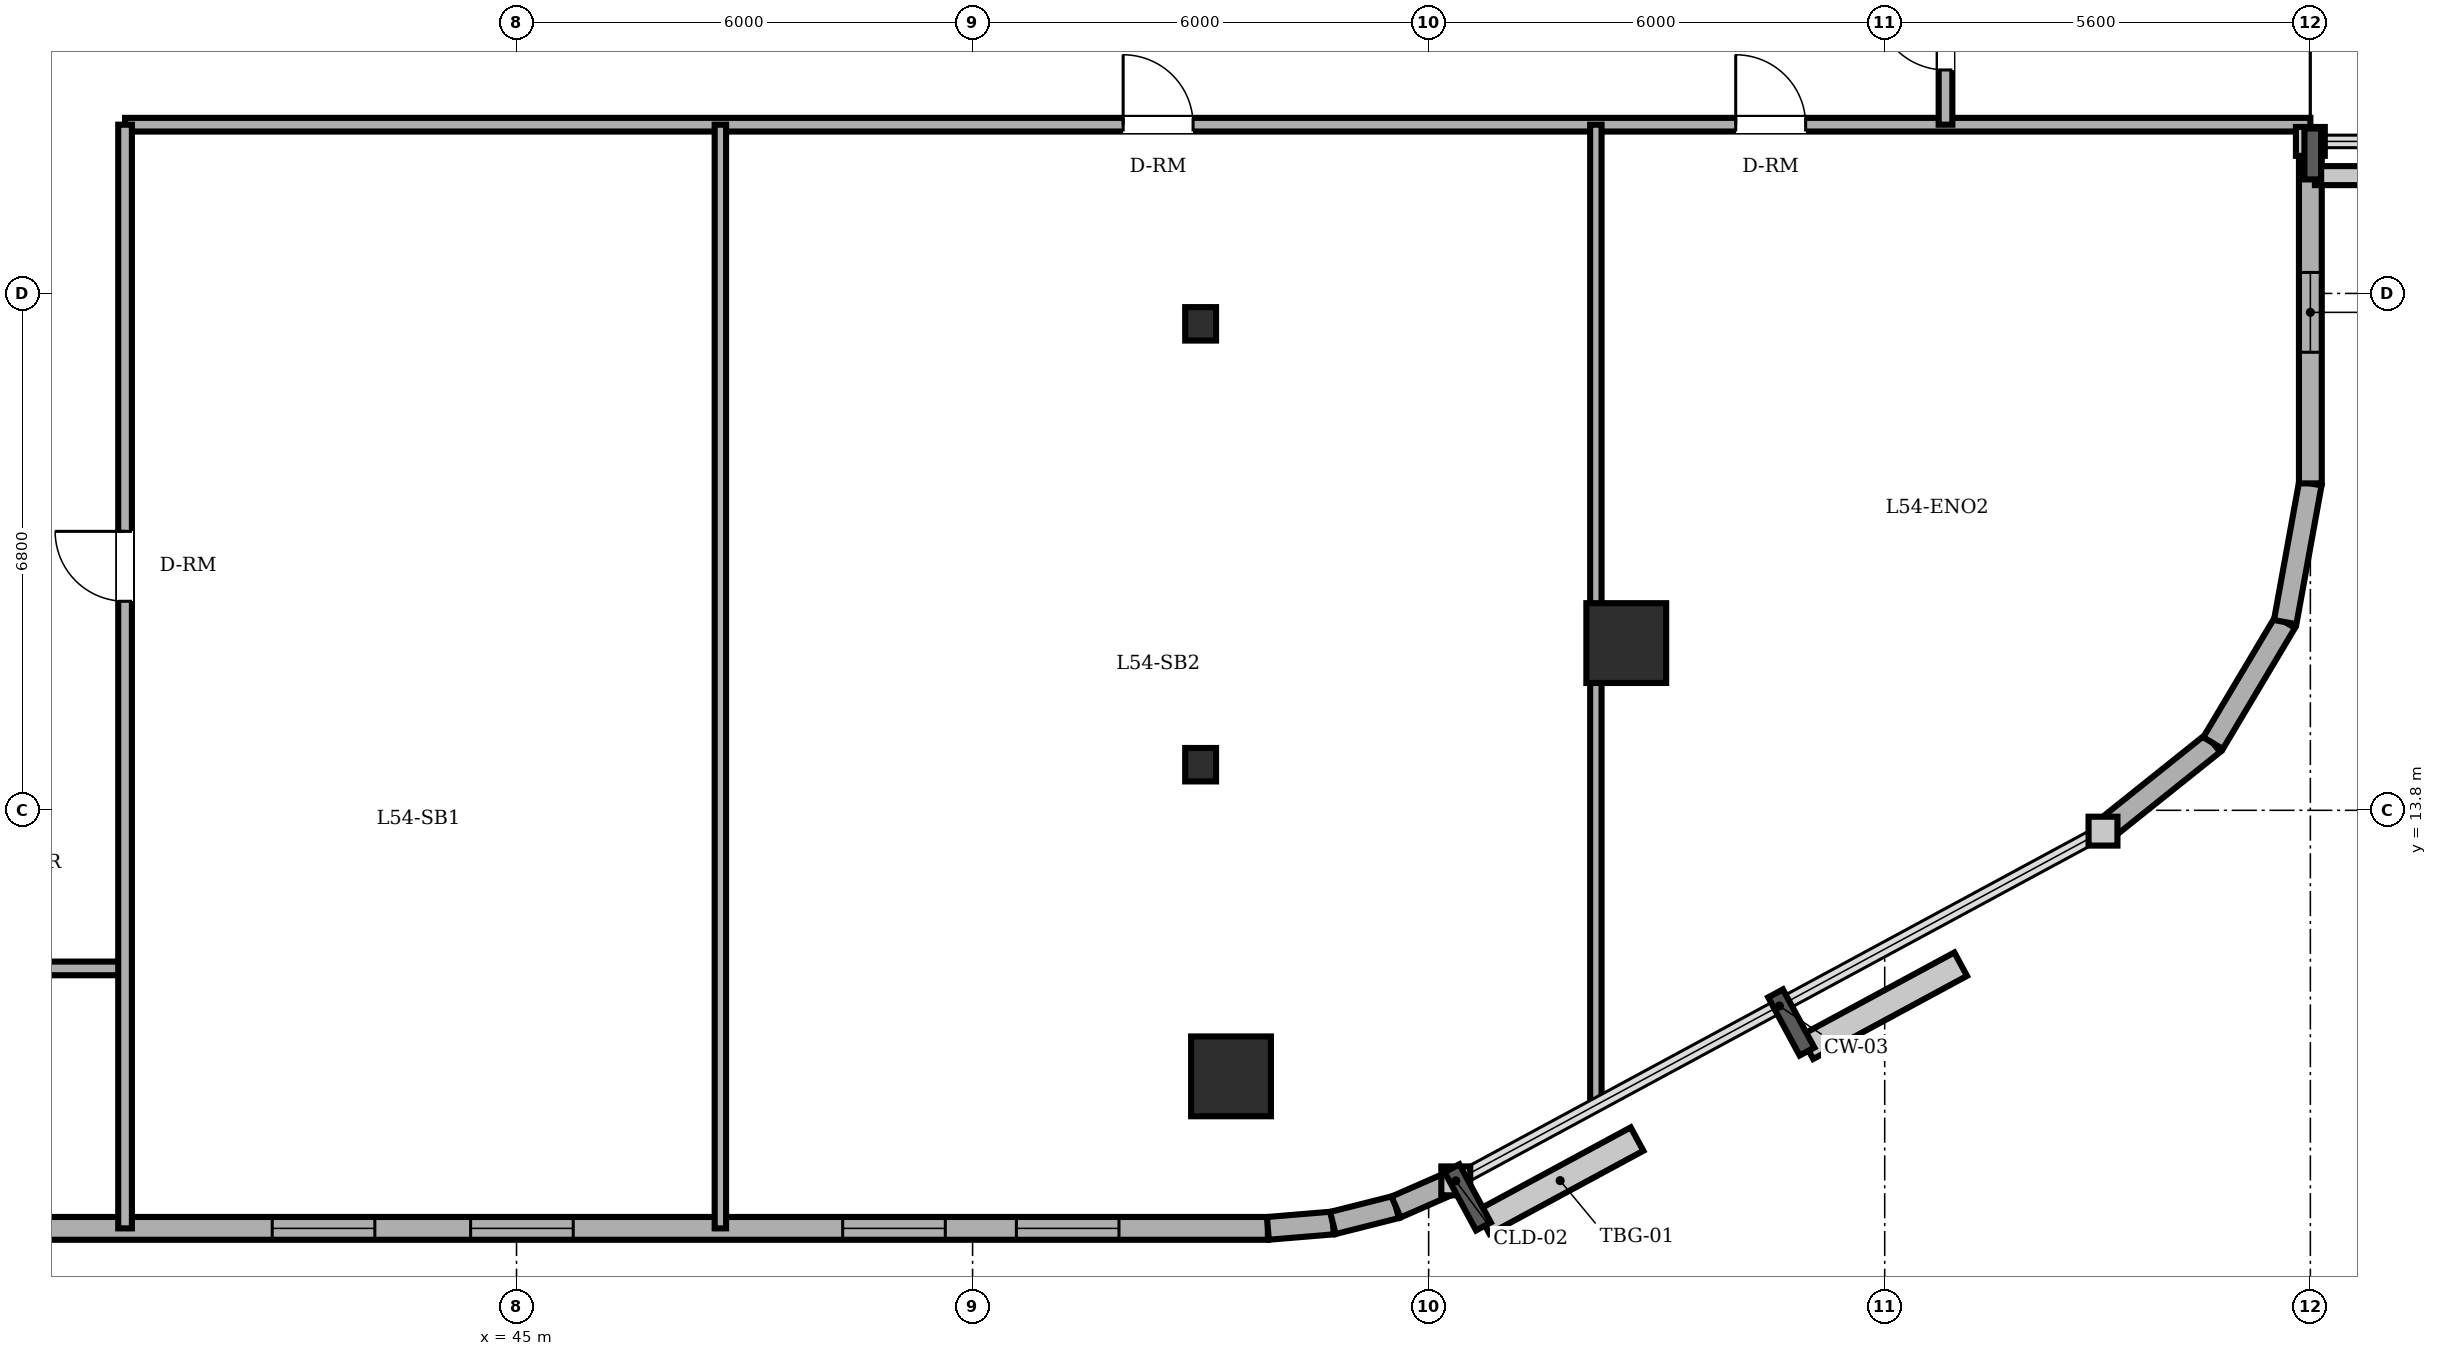
"""IFC4 building model, lengths in metres.
Left out: names, types, materials, properties, quantities, classifications, styles, units other than length and angle.
Written with IfcOpenShell. Run it as: python <this file> out.ifc"""

import sys

from ifc_helpers import new_model, si_unit, direction, frame, frame_2d, origin, origin_2d, place, context, subcontext, project, spatial, rectangle, circle, i_section, extrude, element, fill, save


model = new_model("IFC4")
c1 = context("Model", 3, precision=1e-05, world=origin(), true_north=direction((0.0, 1.0)))
c2 = subcontext(c1, "Body", "Model", "MODEL_VIEW")
j1 = project(units=[si_unit("LENGTHUNIT", "METRE"), si_unit("PLANEANGLEUNIT", "RADIAN")], contexts=[c1])
p1 = place(None, origin())
s1 = spatial("IfcSite", under=j1, at=p1, CompositionType="ELEMENT")
p2 = place(p1, origin())
s2 = spatial("IfcBuilding", under=s1, at=p2, CompositionType="ELEMENT")
p3 = place(p2, frame((0.0, 0.0, 208.5)))
s3 = spatial("IfcBuildingStorey", under=s2, at=p3, CompositionType="ELEMENT", Elevation=208.5)
for number, where, z_axis, x_axis in (
    (1, (54.4, 10.3, 0.0), (0.0, 0.0, 1.0), (1.0, 0.0, 0.0)),
    (2, (59.6, 16.0, 0.0), (0.0, 0.0, 1.0), (1.0, 0.0, 0.0)),
):
    element("IfcColumn", number, at=place(p3, frame(where, z_axis=z_axis, x_axis=x_axis)), inside=s3, PredefinedType="COLUMN", context=c2, shape_type="SweptSolid", body=[
        extrude(circle(Radius=0.525, at=origin_2d()), origin(), (0.0, 0.0, 1.0), 3.6),
    ])
for number, where, z_axis, x_axis in (
    (3, (54.0, 14.4, 0.0), (0.0, 0.0, 1.0), (1.0, 0.0, 0.0)),
    (4, (54.0, 20.2, 0.0), (0.0, 0.0, 1.0), (1.0, 0.0, 0.0)),
):
    element("IfcColumn", number, at=place(p3, frame(where, z_axis=z_axis, x_axis=x_axis)), inside=s3, PredefinedType="COLUMN", context=c2, shape_type="SweptSolid", body=[
        extrude(i_section(OverallWidth=0.406, OverallDepth=0.44, WebThickness=0.024, FlangeThickness=0.039, FilletRadius=0.015, at=origin_2d()), origin(), (0.0, 0.0, 1.0), 3.6),
    ])
p4 = place(p3, frame((22.4, 8.3, 0.0), z_axis=(0.0, 0.0, 1.0), x_axis=(1.0, 0.0, 0.0)))
e5 = element("IfcWall", 5, at=p4, inside=s3, PredefinedType="SOLIDWALL", context=c2, shape_type="SweptSolid", body=[
    extrude(rectangle(XDim=32.485, YDim=0.3, at=frame_2d((16.243, 0.0))), origin(), (0.0, 0.0, 1.0), 3.4),
])
p5 = place(p4, frame((5.075, 0.0, 0.0)))
e6 = element("IfcOpeningElement", 6, at=p5, cuts=e5, PredefinedType="OPENING", context=c2, shape_type="SweptSolid", body=[
    extrude(rectangle(XDim=0.95, YDim=2.2, at=frame_2d((0.475, 1.1))), frame((0.0, 0.16, 0.0), z_axis=(0.0, -1.0, 0.0), x_axis=(1.0, 0.0, 0.0)), (0.0, 0.0, 1.0), 0.32),
])
p6 = place(p4, frame((1.3, 0.0, 0.85)))
e7 = element("IfcOpeningElement", 7, at=p6, cuts=e5, PredefinedType="OPENING", context=c2, shape_type="SweptSolid", body=[
    extrude(rectangle(XDim=1.35, YDim=1.55, at=frame_2d((0.675, 0.775))), frame((0.0, 0.16, 0.0), z_axis=(0.0, -1.0, 0.0), x_axis=(1.0, 0.0, 0.0)), (0.0, 0.0, 1.0), 0.32),
])
p7 = place(p4, frame((10.075, 0.0, 0.85)))
e8 = element("IfcOpeningElement", 8, at=p7, cuts=e5, PredefinedType="OPENING", context=c2, shape_type="SweptSolid", body=[
    extrude(rectangle(XDim=1.35, YDim=1.55, at=frame_2d((0.675, 0.775))), frame((0.0, 0.16, 0.0), z_axis=(0.0, -1.0, 0.0), x_axis=(1.0, 0.0, 0.0)), (0.0, 0.0, 1.0), 0.32),
])
p8 = place(p4, frame((13.425, 0.0, 0.85)))
e9 = element("IfcOpeningElement", 9, at=p8, cuts=e5, PredefinedType="OPENING", context=c2, shape_type="SweptSolid", body=[
    extrude(rectangle(XDim=1.35, YDim=1.55, at=frame_2d((0.675, 0.775))), frame((0.0, 0.16, 0.0), z_axis=(0.0, -1.0, 0.0), x_axis=(1.0, 0.0, 0.0)), (0.0, 0.0, 1.0), 0.32),
])
p9 = place(p4, frame((19.386, 0.0, 0.85)))
e10 = element("IfcOpeningElement", 10, at=p9, cuts=e5, PredefinedType="OPENING", context=c2, shape_type="SweptSolid", body=[
    extrude(rectangle(XDim=1.35, YDim=1.55, at=frame_2d((0.675, 0.775))), frame((0.0, 0.16, 0.0), z_axis=(0.0, -1.0, 0.0), x_axis=(1.0, 0.0, 0.0)), (0.0, 0.0, 1.0), 0.32),
])
p10 = place(p4, frame((21.996, 0.0, 0.85)))
e11 = element("IfcOpeningElement", 11, at=p10, cuts=e5, PredefinedType="OPENING", context=c2, shape_type="SweptSolid", body=[
    extrude(rectangle(XDim=1.35, YDim=1.55, at=frame_2d((0.675, 0.775))), frame((0.0, 0.16, 0.0), z_axis=(0.0, -1.0, 0.0), x_axis=(1.0, 0.0, 0.0)), (0.0, 0.0, 1.0), 0.32),
])
p11 = place(p4, frame((26.891, 0.0, 0.85)))
e12 = element("IfcOpeningElement", 12, at=p11, cuts=e5, PredefinedType="OPENING", context=c2, shape_type="SweptSolid", body=[
    extrude(rectangle(XDim=1.35, YDim=1.55, at=frame_2d((0.675, 0.775))), frame((0.0, 0.16, 0.0), z_axis=(0.0, -1.0, 0.0), x_axis=(1.0, 0.0, 0.0)), (0.0, 0.0, 1.0), 0.32),
])
p12 = place(p4, frame((29.176, 0.0, 0.85)))
e13 = element("IfcOpeningElement", 13, at=p12, cuts=e5, PredefinedType="OPENING", context=c2, shape_type="SweptSolid", body=[
    extrude(rectangle(XDim=1.35, YDim=1.55, at=frame_2d((0.675, 0.775))), frame((0.0, 0.16, 0.0), z_axis=(0.0, -1.0, 0.0), x_axis=(1.0, 0.0, 0.0)), (0.0, 0.0, 1.0), 0.32),
])
p13 = place(p3, frame((54.885, 8.3, 0.0), z_axis=(0.0, 0.0, 1.0), x_axis=(0.996565355958, 0.082809971041, 0.0)))
e14 = element("IfcWall", 14, at=p13, inside=s3, PredefinedType="SOLIDWALL", context=c2, shape_type="SweptSolid", body=[
    extrude(rectangle(XDim=0.858, YDim=0.3, at=frame_2d((0.429, 0.0))), origin(), (0.0, 0.0, 1.0), 3.4),
])
p14 = place(p3, frame((55.74, 8.371, 0.0), z_axis=(0.0, 0.0, 1.0), x_axis=(0.969536346338, 0.244947490555, 0.0)))
e15 = element("IfcWall", 15, at=p14, inside=s3, PredefinedType="SOLIDWALL", context=c2, shape_type="SweptSolid", body=[
    extrude(rectangle(XDim=0.857, YDim=0.3, at=frame_2d((0.429, 0.0))), origin(), (0.0, 0.0, 1.0), 3.4),
])
p15 = place(p3, frame((56.571, 8.581, 0.0), z_axis=(0.0, 0.0, 1.0), x_axis=(0.916085473636, 0.400983048261, 0.0)))
e16 = element("IfcWall", 16, at=p15, inside=s3, PredefinedType="SOLIDWALL", context=c2, shape_type="SweptSolid", body=[
    extrude(rectangle(XDim=0.858, YDim=0.3, at=frame_2d((0.429, 0.0))), origin(), (0.0, 0.0, 1.0), 3.4),
])
p16 = place(p3, frame((65.872, 13.526, 0.0), z_axis=(0.0, 0.0, 1.0), x_axis=(0.780920189257, 0.624630817372, 0.0)))
e17 = element("IfcWall", 17, at=p16, inside=s3, PredefinedType="SOLIDWALL", context=c2, shape_type="SweptSolid", body=[
    extrude(rectangle(XDim=1.854, YDim=0.3, at=frame_2d((0.927, 0.0))), origin(), (0.0, 0.0, 1.0), 3.4),
])
p17 = place(p3, frame((67.32, 14.684, 0.0), z_axis=(0.0, 0.0, 1.0), x_axis=(0.512072018927, 0.858942516955, 0.0)))
e18 = element("IfcWall", 18, at=p17, inside=s3, PredefinedType="SOLIDWALL", context=c2, shape_type="SweptSolid", body=[
    extrude(rectangle(XDim=1.853, YDim=0.3, at=frame_2d((0.927, 0.0))), origin(), (0.0, 0.0, 1.0), 3.4),
])
p18 = place(p3, frame((68.269, 16.276, 0.0), z_axis=(0.0, 0.0, 1.0), x_axis=(0.178468469252, 0.983945631365, 0.0)))
e19 = element("IfcWall", 19, at=p18, inside=s3, PredefinedType="SOLIDWALL", context=c2, shape_type="SweptSolid", body=[
    extrude(rectangle(XDim=1.855, YDim=0.3, at=frame_2d((0.927, 0.0))), origin(), (0.0, 0.0, 1.0), 3.4),
])
p19 = place(p3, frame((68.6, 18.101, 0.0), z_axis=(0.0, 0.0, 1.0), x_axis=(0.0, 1.0, 0.0)))
e20 = element("IfcWall", 20, at=p19, inside=s3, PredefinedType="SOLIDWALL", context=c2, shape_type="SweptSolid", body=[
    extrude(rectangle(XDim=4.499, YDim=0.3, at=frame_2d((2.25, 0.0))), origin(), (0.0, 0.0, 1.0), 3.4),
])
p20 = place(p19, frame((1.725, 0.0, 0.85)))
e21 = element("IfcOpeningElement", 21, at=p20, cuts=e20, PredefinedType="OPENING", context=c2, shape_type="SweptSolid", body=[
    extrude(rectangle(XDim=1.05, YDim=1.55, at=frame_2d((0.525, 0.775))), frame((0.0, 0.16, 0.0), z_axis=(0.0, -1.0, 0.0), x_axis=(1.0, 0.0, 0.0)), (0.0, 0.0, 1.0), 0.32),
])
p21 = place(p3, frame((17.677, 11.72, 0.0), z_axis=(0.0, 0.0, 1.0), x_axis=(1.0, 0.0, 0.0)))
e22 = element("IfcWall", 22, at=p21, inside=s3, PredefinedType="PARTITIONING", context=c2, shape_type="SweptSolid", body=[
    extrude(rectangle(XDim=22.173, YDim=0.18, at=frame_2d((11.086, 0.0))), origin(), (0.0, 0.0, 1.0), 3.4),
])
p22 = place(p21, frame((9.763, 0.0, 0.0)))
e23 = element("IfcOpeningElement", 23, at=p22, cuts=e22, PredefinedType="OPENING", context=c2, shape_type="SweptSolid", body=[
    extrude(rectangle(XDim=0.92, YDim=2.1, at=frame_2d((0.46, 1.05))), frame((0.0, 0.1, 0.0), z_axis=(0.0, -1.0, 0.0), x_axis=(1.0, 0.0, 0.0)), (0.0, 0.0, 1.0), 0.2),
])
p23 = place(p21, frame((4.063, 0.0, 0.0)))
e24 = element("IfcOpeningElement", 24, at=p23, cuts=e22, PredefinedType="OPENING", context=c2, shape_type="SweptSolid", body=[
    extrude(rectangle(XDim=0.92, YDim=2.1, at=frame_2d((0.46, 1.05))), frame((0.0, 0.1, 0.0), z_axis=(0.0, -1.0, 0.0), x_axis=(1.0, 0.0, 0.0)), (0.0, 0.0, 1.0), 0.2),
])
p24 = place(p21, frame((16.428, 0.0, 0.0)))
e25 = element("IfcOpeningElement", 25, at=p24, cuts=e22, PredefinedType="OPENING", context=c2, shape_type="SweptSolid", body=[
    extrude(rectangle(XDim=0.92, YDim=2.1, at=frame_2d((0.46, 1.05))), frame((0.0, 0.1, 0.0), z_axis=(0.0, -1.0, 0.0), x_axis=(1.0, 0.0, 0.0)), (0.0, 0.0, 1.0), 0.2),
])
p25 = place(p3, frame((39.85, 22.82, 0.0), z_axis=(0.0, 0.0, 1.0), x_axis=(1.0, 0.0, 0.0)))
e26 = element("IfcWall", 26, at=p25, inside=s3, PredefinedType="PARTITIONING", context=c2, shape_type="SweptSolid", body=[
    extrude(rectangle(XDim=28.75, YDim=0.18, at=frame_2d((14.375, 0.0))), origin(), (0.0, 0.0, 1.0), 3.4),
])
p26 = place(p25, frame((13.131, 0.0, 0.0)))
e27 = element("IfcOpeningElement", 27, at=p26, cuts=e26, PredefinedType="OPENING", context=c2, shape_type="SweptSolid", body=[
    extrude(rectangle(XDim=0.92, YDim=2.1, at=frame_2d((0.46, 1.05))), frame((0.0, 0.1, 0.0), z_axis=(0.0, -1.0, 0.0), x_axis=(1.0, 0.0, 0.0)), (0.0, 0.0, 1.0), 0.2),
])
p27 = place(p25, frame((21.19, 0.0, 0.0)))
e28 = element("IfcOpeningElement", 28, at=p27, cuts=e26, PredefinedType="OPENING", context=c2, shape_type="SweptSolid", body=[
    extrude(rectangle(XDim=0.92, YDim=2.1, at=frame_2d((0.46, 1.05))), frame((0.0, 0.1, 0.0), z_axis=(0.0, -1.0, 0.0), x_axis=(1.0, 0.0, 0.0)), (0.0, 0.0, 1.0), 0.2),
])
p28 = place(p3, frame((39.85, 8.3, 0.0), z_axis=(0.0, 0.0, 1.0), x_axis=(0.0, 1.0, 0.0)))
e29 = element("IfcWall", 29, at=p28, inside=s3, PredefinedType="PARTITIONING", context=c2, shape_type="SweptSolid", body=[
    extrude(rectangle(XDim=14.52, YDim=0.18, at=frame_2d((7.26, 0.0))), origin(), (0.0, 0.0, 1.0), 3.4),
])
p29 = place(p28, frame((8.25, 0.0, 0.0)))
e30 = element("IfcOpeningElement", 30, at=p29, cuts=e29, PredefinedType="OPENING", context=c2, shape_type="SweptSolid", body=[
    extrude(rectangle(XDim=0.92, YDim=2.1, at=frame_2d((0.46, 1.05))), frame((0.0, 0.1, 0.0), z_axis=(0.0, -1.0, 0.0), x_axis=(1.0, 0.0, 0.0)), (0.0, 0.0, 1.0), 0.2),
])
p30 = place(p3, frame((47.682, 8.3, 0.0), z_axis=(0.0, 0.0, 1.0), x_axis=(0.0, 1.0, 0.0)))
e31 = element("IfcWall", 31, at=p30, inside=s3, PredefinedType="PARTITIONING", context=c2, shape_type="SweptSolid", body=[
    extrude(rectangle(XDim=14.52, YDim=0.15, at=frame_2d((7.26, 0.0))), origin(), (0.0, 0.0, 1.0), 3.4),
])
p31 = place(p3, frame((59.2, 9.921, 0.0), z_axis=(0.0, 0.0, 1.0), x_axis=(0.0, 1.0, 0.0)))
e32 = element("IfcWall", 32, at=p31, inside=s3, PredefinedType="PARTITIONING", context=c2, shape_type="SweptSolid", body=[
    extrude(rectangle(XDim=12.899, YDim=0.15, at=frame_2d((6.45, 0.0))), origin(), (0.0, 0.0, 1.0), 3.4),
])
p32 = place(p3, frame((63.8, 22.82, 0.0), z_axis=(0.0, 0.0, 1.0), x_axis=(0.0, 1.0, 0.0)))
e33 = element("IfcWall", 33, at=p32, inside=s3, PredefinedType="PARTITIONING", context=c2, shape_type="SweptSolid", body=[
    extrude(rectangle(XDim=2.36, YDim=0.18, at=frame_2d((1.18, 0.0))), origin(), (0.0, 0.0, 1.0), 3.4),
])
p33 = place(p32, frame((0.72, 0.0, 0.0)))
e34 = element("IfcOpeningElement", 34, at=p33, cuts=e33, PredefinedType="OPENING", context=c2, shape_type="SweptSolid", body=[
    extrude(rectangle(XDim=0.92, YDim=2.1, at=frame_2d((0.46, 1.05))), frame((0.0, 0.1, 0.0), z_axis=(0.0, -1.0, 0.0), x_axis=(1.0, 0.0, 0.0)), (0.0, 0.0, 1.0), 0.2),
])
p34 = place(p9, origin())
e35 = element("IfcWindow", 35, at=p34, inside=s3, PartitioningType="SINGLE_PANEL", PredefinedType="WINDOW", context=c2, shape_type="SweptSolid", body=[
    extrude(rectangle(XDim=1.35, YDim=1.55, at=frame_2d((0.675, 0.775))), frame((0.0, 0.03, 0.0), z_axis=(0.0, -1.0, 0.0), x_axis=(1.0, 0.0, 0.0)), (0.0, 0.0, 1.0), 0.06),
])
fill(e10, e35)
p35 = place(p10, origin())
e36 = element("IfcWindow", 36, at=p35, inside=s3, PartitioningType="SINGLE_PANEL", PredefinedType="WINDOW", context=c2, shape_type="SweptSolid", body=[
    extrude(rectangle(XDim=1.35, YDim=1.55, at=frame_2d((0.675, 0.775))), frame((0.0, 0.03, 0.0), z_axis=(0.0, -1.0, 0.0), x_axis=(1.0, 0.0, 0.0)), (0.0, 0.0, 1.0), 0.06),
])
fill(e11, e36)
p36 = place(p11, origin())
e37 = element("IfcWindow", 37, at=p36, inside=s3, PartitioningType="SINGLE_PANEL", PredefinedType="WINDOW", context=c2, shape_type="SweptSolid", body=[
    extrude(rectangle(XDim=1.35, YDim=1.55, at=frame_2d((0.675, 0.775))), frame((0.0, 0.03, 0.0), z_axis=(0.0, -1.0, 0.0), x_axis=(1.0, 0.0, 0.0)), (0.0, 0.0, 1.0), 0.06),
])
fill(e12, e37)
p37 = place(p12, origin())
e38 = element("IfcWindow", 38, at=p37, inside=s3, PartitioningType="SINGLE_PANEL", PredefinedType="WINDOW", context=c2, shape_type="SweptSolid", body=[
    extrude(rectangle(XDim=1.35, YDim=1.55, at=frame_2d((0.675, 0.775))), frame((0.0, 0.03, 0.0), z_axis=(0.0, -1.0, 0.0), x_axis=(1.0, 0.0, 0.0)), (0.0, 0.0, 1.0), 0.06),
])
fill(e13, e38)
p38 = place(p20, origin())
e39 = element("IfcWindow", 39, at=p38, inside=s3, PartitioningType="SINGLE_PANEL", PredefinedType="WINDOW", context=c2, shape_type="SweptSolid", body=[
    extrude(rectangle(XDim=1.05, YDim=1.55, at=frame_2d((0.525, 0.775))), frame((0.0, 0.03, 0.0), z_axis=(0.0, -1.0, 0.0), x_axis=(1.0, 0.0, 0.0)), (0.0, 0.0, 1.0), 0.06),
])
fill(e21, e39)
p39 = place(p29, origin())
e40 = element("IfcDoor", 40, at=p39, inside=s3, OperationType="SINGLE_SWING_RIGHT", PredefinedType="DOOR", context=c2, shape_type="SweptSolid", body=[
    extrude(rectangle(XDim=0.92, YDim=2.1, at=frame_2d((0.46, 1.05))), frame((0.0, 0.025, 0.0), z_axis=(0.0, -1.0, 0.0), x_axis=(1.0, 0.0, 0.0)), (0.0, 0.0, 1.0), 0.05),
])
fill(e30, e40)
p40 = place(p26, origin())
e41 = element("IfcDoor", 41, at=p40, inside=s3, OperationType="SINGLE_SWING_LEFT", PredefinedType="DOOR", context=c2, shape_type="SweptSolid", body=[
    extrude(rectangle(XDim=0.92, YDim=2.1, at=frame_2d((0.46, 1.05))), frame((0.0, 0.025, 0.0), z_axis=(0.0, -1.0, 0.0), x_axis=(1.0, 0.0, 0.0)), (0.0, 0.0, 1.0), 0.05),
])
fill(e27, e41)
p41 = place(p27, origin())
e42 = element("IfcDoor", 42, at=p41, inside=s3, OperationType="SINGLE_SWING_LEFT", PredefinedType="DOOR", context=c2, shape_type="SweptSolid", body=[
    extrude(rectangle(XDim=0.92, YDim=2.1, at=frame_2d((0.46, 1.05))), frame((0.0, 0.025, 0.0), z_axis=(0.0, -1.0, 0.0), x_axis=(1.0, 0.0, 0.0)), (0.0, 0.0, 1.0), 0.05),
])
fill(e28, e42)
p42 = place(p33, origin())
e43 = element("IfcDoor", 43, at=p42, inside=s3, OperationType="SINGLE_SWING_RIGHT", PredefinedType="DOOR", context=c2, shape_type="SweptSolid", body=[
    extrude(rectangle(XDim=0.92, YDim=2.1, at=frame_2d((0.46, 1.05))), frame((0.0, 0.025, 0.0), z_axis=(0.0, -1.0, 0.0), x_axis=(1.0, 0.0, 0.0)), (0.0, 0.0, 1.0), 0.05),
])
fill(e34, e43)
save(model, sys.argv[1])
